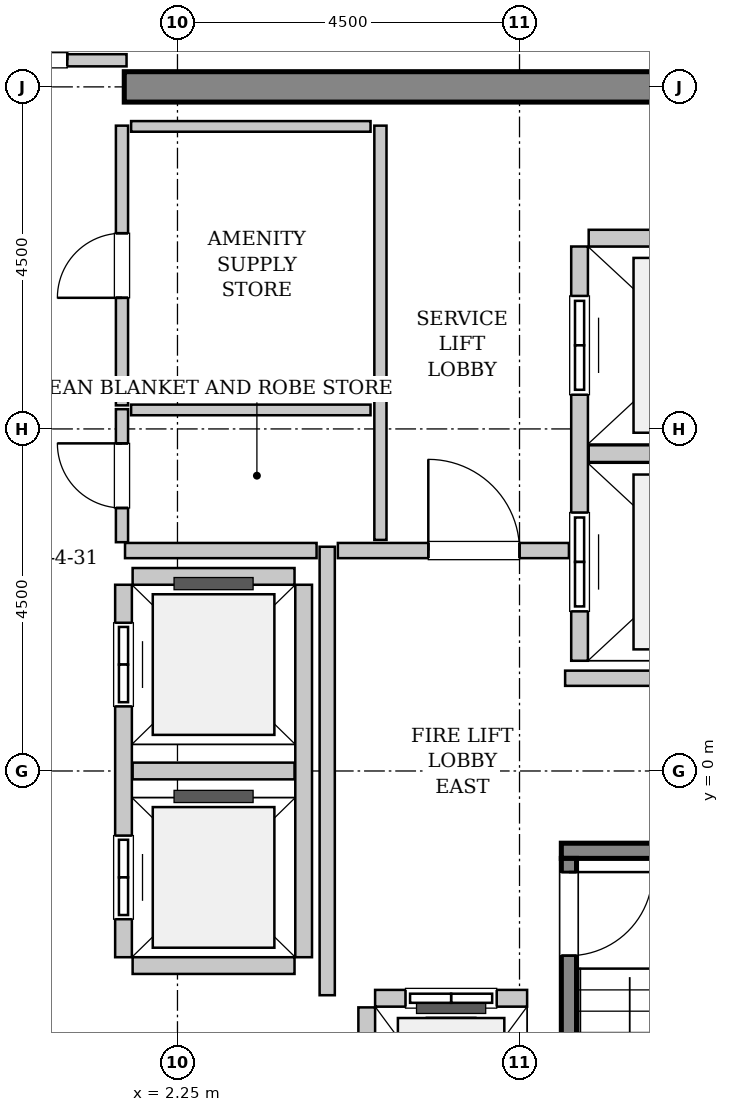
"""IFC4 building model, lengths in metres.
Left out: names, types, materials, properties, quantities, classifications, styles, units other than length and angle.
Written with IfcOpenShell. Run it as: python <this file> out.ifc"""

import sys

from ifc_helpers import new_model, si_unit, direction, frame, frame_2d, origin, place, context, subcontext, project, spatial, rectangle, extrude, source, transform, mapped, element, fill, save


model = new_model("IFC4")
c1 = context("Model", 3, precision=1e-05, world=origin(), true_north=direction((0.0, 1.0)))
c2 = subcontext(c1, "Body", "Model", "MODEL_VIEW")
j1 = project(units=[si_unit("LENGTHUNIT", "METRE"), si_unit("PLANEANGLEUNIT", "RADIAN")], contexts=[c1])
p1 = place(None, origin())
s1 = spatial("IfcSite", under=j1, at=p1, CompositionType="ELEMENT")
p2 = place(p1, origin())
s2 = spatial("IfcBuilding", under=s1, at=p2, CompositionType="ELEMENT")
p3 = place(p2, frame((0.0, 0.0, 349.0)))
s3 = spatial("IfcBuildingStorey", under=s2, at=p3, CompositionType="ELEMENT", Elevation=349.0)
m1 = source(origin(), c2, "Body", "SweptSolid", [
    extrude(rectangle(XDim=9.9, YDim=0.4, at=frame_2d((4.95, 0.0))), origin(), (0.0, 0.0, 1.0), 4.8),
])
p4 = place(p3, frame((1.55, 9.0, 0.0), z_axis=(0.0, 0.0, 1.0), x_axis=(1.0, 0.0, 0.0)))
e1 = element("IfcWall", 1, at=p4, inside=s3, PredefinedType="SHEAR", context=c2, shape_type="MappedRepresentation", body=[
    mapped(m1, transform((0.0, 0.0, 0.0), x_axis=(1.0, 0.0, 0.0), y_axis=(0.0, 1.0, 0.0), z_axis=(0.0, 0.0, 1.0), scale=1.0)),
])
m2 = source(origin(), c2, "Body", "SweptSolid", [
    extrude(rectangle(XDim=3.4, YDim=0.2, at=frame_2d((1.7, 0.0))), origin(), (0.0, 0.0, 1.0), 4.8),
])
p5 = place(p3, frame((7.3, -1.05, 0.0), z_axis=(0.0, 0.0, 1.0), x_axis=(1.0, 0.0, 0.0)))
e2 = element("IfcWall", 2, at=p5, inside=s3, PredefinedType="SOLIDWALL", context=c2, shape_type="MappedRepresentation", body=[
    mapped(m2, transform((0.0, 0.0, 0.0), x_axis=(1.0, 0.0, 0.0), y_axis=(0.0, 1.0, 0.0), z_axis=(0.0, 0.0, 1.0), scale=1.0)),
])
m3 = source(origin(), c2, "Body", "SweptSolid", [
    extrude(rectangle(XDim=7.1, YDim=0.2, at=frame_2d((3.55, 0.0))), origin(), (0.0, 0.0, 1.0), 4.8),
])
p6 = place(p3, frame((7.4, -1.15, 0.0), z_axis=(0.0, 0.0, 1.0), x_axis=(0.0, -1.0, 0.0)))
e3 = element("IfcWall", 3, at=p6, inside=s3, PredefinedType="SOLIDWALL", context=c2, shape_type="MappedRepresentation", body=[
    mapped(m3, transform((0.0, 0.0, 0.0), x_axis=(1.0, 0.0, 0.0), y_axis=(0.0, 1.0, 0.0), z_axis=(0.0, 0.0, 1.0), scale=1.0)),
])
p7 = place(p6, frame((0.18, 0.0, 0.0)))
e4 = element("IfcOpeningElement", 4, at=p7, cuts=e3, PredefinedType="OPENING", context=c2, shape_type="SweptSolid", body=[
    extrude(rectangle(XDim=1.1, YDim=2.15, at=frame_2d((0.55, 1.075))), frame((0.0, 0.11, 0.0), z_axis=(0.0, -1.0, 0.0), x_axis=(1.0, 0.0, 0.0)), (0.0, 0.0, 1.0), 0.22),
])
m4 = source(origin(), c2, "Body", "SweptSolid", [
    extrude(rectangle(XDim=2.0, YDim=0.22, at=frame_2d((1.0, 0.0))), origin(), (0.0, 0.0, 1.0), 4.485),
])
p8 = place(p3, frame((6.85, -2.99, 0.0), z_axis=(0.0, 0.0, 1.0), x_axis=(-1.0, 0.0, 0.0)))
e5 = element("IfcWall", 5, at=p8, inside=s3, PredefinedType="SOLIDWALL", context=c2, shape_type="MappedRepresentation", body=[
    mapped(m4, transform((0.0, 0.0, 0.0), x_axis=(1.0, 0.0, 0.0), y_axis=(0.0, 1.0, 0.0), z_axis=(0.0, 0.0, 1.0), scale=1.0)),
])
p9 = place(p8, frame((0.4, 0.0, 0.0)))
e6 = element("IfcOpeningElement", 6, at=p9, cuts=e5, PredefinedType="OPENING", context=c2, shape_type="SweptSolid", body=[
    extrude(rectangle(XDim=1.2, YDim=2.2, at=frame_2d((0.6, 1.1))), frame((0.0, 0.12, 0.0), z_axis=(0.0, -1.0, 0.0), x_axis=(1.0, 0.0, 0.0)), (0.0, 0.0, 1.0), 0.24),
])
m5 = source(origin(), c2, "Body", "SweptSolid", [
    extrude(rectangle(XDim=2.68, YDim=0.22, at=frame_2d((1.34, 0.0))), origin(), (0.0, 0.0, 1.0), 4.485),
])
p10 = place(p3, frame((4.74, -3.11, 0.0), z_axis=(0.0, 0.0, 1.0), x_axis=(0.0, -1.0, 0.0)))
e7 = element("IfcWall", 7, at=p10, inside=s3, PredefinedType="SOLIDWALL", context=c2, shape_type="MappedRepresentation", body=[
    mapped(m5, transform((0.0, 0.0, 0.0), x_axis=(1.0, 0.0, 0.0), y_axis=(0.0, 1.0, 0.0), z_axis=(0.0, 0.0, 1.0), scale=1.0)),
])
m6 = source(origin(), c2, "Body", "SweptSolid", [
    extrude(rectangle(XDim=5.45, YDim=0.22, at=frame_2d((2.725, 0.0))), origin(), (0.0, 0.0, 1.0), 4.485),
])
p11 = place(p3, frame((7.54, 6.9, 0.0), z_axis=(0.0, 0.0, 1.0), x_axis=(0.0, -1.0, 0.0)))
e8 = element("IfcWall", 8, at=p11, inside=s3, PredefinedType="SOLIDWALL", context=c2, shape_type="MappedRepresentation", body=[
    mapped(m6, transform((0.0, 0.0, 0.0), x_axis=(1.0, 0.0, 0.0), y_axis=(0.0, 1.0, 0.0), z_axis=(0.0, 0.0, 1.0), scale=1.0)),
])
p12 = place(p11, frame((3.5, 0.0, 0.0)))
e9 = element("IfcOpeningElement", 9, at=p12, cuts=e8, PredefinedType="OPENING", context=c2, shape_type="SweptSolid", body=[
    extrude(rectangle(XDim=1.3, YDim=2.3, at=frame_2d((0.65, 1.15))), frame((0.0, 0.12, 0.0), z_axis=(0.0, -1.0, 0.0), x_axis=(1.0, 0.0, 0.0)), (0.0, 0.0, 1.0), 0.24),
])
p13 = place(p11, frame((0.65, 0.0, 0.0)))
e10 = element("IfcOpeningElement", 10, at=p13, cuts=e8, PredefinedType="OPENING", context=c2, shape_type="SweptSolid", body=[
    extrude(rectangle(XDim=1.3, YDim=2.3, at=frame_2d((0.65, 1.15))), frame((0.0, 0.12, 0.0), z_axis=(0.0, -1.0, 0.0), x_axis=(1.0, 0.0, 0.0)), (0.0, 0.0, 1.0), 0.24),
])
m7 = source(origin(), c2, "Body", "SweptSolid", [
    extrude(rectangle(XDim=2.78, YDim=0.22, at=frame_2d((1.39, 0.0))), origin(), (0.0, 0.0, 1.0), 4.485),
])
for number, where, z_axis, x_axis in (
    (11, (7.66, 4.175, 0.0), (0.0, 0.0, 1.0), (1.0, 0.0, 0.0)),
    (12, (10.44, 7.01, 0.0), (0.0, 0.0, 1.0), (-1.0, 0.0, 0.0)),
):
    element("IfcWall", number, at=place(p3, frame(where, z_axis=z_axis, x_axis=x_axis)), inside=s3, PredefinedType="SOLIDWALL", context=c2, shape_type="MappedRepresentation", body=[
        mapped(m7, transform((0.0, 0.0, 0.0), x_axis=(1.0, 0.0, 0.0), y_axis=(0.0, 1.0, 0.0), z_axis=(0.0, 0.0, 1.0), scale=1.0)),
    ])
m8 = source(origin(), c2, "Body", "SweptSolid", [
    extrude(rectangle(XDim=4.9, YDim=0.22, at=frame_2d((2.45, 0.0))), origin(), (0.0, 0.0, 1.0), 4.485),
])
p14 = place(p3, frame((1.54, 2.45, 0.0), z_axis=(0.0, 0.0, 1.0), x_axis=(0.0, -1.0, 0.0)))
e13 = element("IfcWall", 13, at=p14, inside=s3, PredefinedType="SOLIDWALL", context=c2, shape_type="MappedRepresentation", body=[
    mapped(m8, transform((0.0, 0.0, 0.0), x_axis=(1.0, 0.0, 0.0), y_axis=(0.0, 1.0, 0.0), z_axis=(0.0, 0.0, 1.0), scale=1.0)),
])
p15 = place(p14, frame((3.3, 0.0, 0.0)))
e14 = element("IfcOpeningElement", 14, at=p15, cuts=e13, PredefinedType="OPENING", context=c2, shape_type="SweptSolid", body=[
    extrude(rectangle(XDim=1.1, YDim=2.2, at=frame_2d((0.55, 1.1))), frame((0.0, 0.12, 0.0), z_axis=(0.0, -1.0, 0.0), x_axis=(1.0, 0.0, 0.0)), (0.0, 0.0, 1.0), 0.24),
])
p16 = place(p14, frame((0.5, 0.0, 0.0)))
e15 = element("IfcOpeningElement", 15, at=p16, cuts=e13, PredefinedType="OPENING", context=c2, shape_type="SweptSolid", body=[
    extrude(rectangle(XDim=1.1, YDim=2.2, at=frame_2d((0.55, 1.1))), frame((0.0, 0.12, 0.0), z_axis=(0.0, -1.0, 0.0), x_axis=(1.0, 0.0, 0.0)), (0.0, 0.0, 1.0), 0.24),
])
p17 = place(p3, frame((3.91, -2.45, 0.0), z_axis=(0.0, 0.0, 1.0), x_axis=(0.0, 1.0, 0.0)))
e16 = element("IfcWall", 16, at=p17, inside=s3, PredefinedType="SOLIDWALL", context=c2, shape_type="MappedRepresentation", body=[
    mapped(m8, transform((0.0, 0.0, 0.0), x_axis=(1.0, 0.0, 0.0), y_axis=(0.0, 1.0, 0.0), z_axis=(0.0, 0.0, 1.0), scale=1.0)),
])
m9 = source(origin(), c2, "Body", "SweptSolid", [
    extrude(rectangle(XDim=2.13, YDim=0.22, at=frame_2d((1.065, 0.0))), origin(), (0.0, 0.0, 1.0), 4.485),
])
for number, where, z_axis, x_axis in (
    (17, (1.66, -2.56, 0.0), (0.0, 0.0, 1.0), (1.0, 0.0, 0.0)),
    (18, (1.66, 0.0, 0.0), (0.0, 0.0, 1.0), (1.0, 0.0, 0.0)),
    (19, (3.79, 2.56, 0.0), (0.0, 0.0, 1.0), (-1.0, 0.0, 0.0)),
):
    element("IfcWall", number, at=place(p3, frame(where, z_axis=z_axis, x_axis=x_axis)), inside=s3, PredefinedType="SOLIDWALL", context=c2, shape_type="MappedRepresentation", body=[
        mapped(m9, transform((0.0, 0.0, 0.0), x_axis=(1.0, 0.0, 0.0), y_axis=(0.0, 1.0, 0.0), z_axis=(0.0, 0.0, 1.0), scale=1.0)),
    ])
m10 = source(origin(), c2, "Body", "SweptSolid", [
    extrude(rectangle(XDim=5.9, YDim=0.2, at=frame_2d((2.95, 0.0))), origin(), (0.0, 0.0, 1.0), 4.485),
])
p18 = place(p3, frame((4.22, -2.95, 0.0), z_axis=(0.0, 0.0, 1.0), x_axis=(0.0, 1.0, 0.0)))
e20 = element("IfcWall", 20, at=p18, inside=s3, PredefinedType="PARTITIONING", context=c2, shape_type="MappedRepresentation", body=[
    mapped(m10, transform((0.0, 0.0, 0.0), x_axis=(1.0, 0.0, 0.0), y_axis=(0.0, 1.0, 0.0), z_axis=(0.0, 0.0, 1.0), scale=1.0)),
])
m11 = source(origin(), c2, "Body", "SweptSolid", [
    extrude(rectangle(XDim=2.52, YDim=0.2, at=frame_2d((1.26, 0.0))), origin(), (0.0, 0.0, 1.0), 4.485),
])
p19 = place(p3, frame((1.56, 2.9, 0.0), z_axis=(0.0, 0.0, 1.0), x_axis=(1.0, 0.0, 0.0)))
e21 = element("IfcWall", 21, at=p19, inside=s3, PredefinedType="PARTITIONING", context=c2, shape_type="MappedRepresentation", body=[
    mapped(m11, transform((0.0, 0.0, 0.0), x_axis=(1.0, 0.0, 0.0), y_axis=(0.0, 1.0, 0.0), z_axis=(0.0, 0.0, 1.0), scale=1.0)),
])
m12 = source(origin(), c2, "Body", "SweptSolid", [
    extrude(rectangle(XDim=3.04, YDim=0.2, at=frame_2d((1.52, 0.0))), origin(), (0.0, 0.0, 1.0), 4.485),
])
p20 = place(p3, frame((4.36, 2.9, 0.0), z_axis=(0.0, 0.0, 1.0), x_axis=(1.0, 0.0, 0.0)))
e22 = element("IfcWall", 22, at=p20, inside=s3, PredefinedType="PARTITIONING", context=c2, shape_type="MappedRepresentation", body=[
    mapped(m12, transform((0.0, 0.0, 0.0), x_axis=(1.0, 0.0, 0.0), y_axis=(0.0, 1.0, 0.0), z_axis=(0.0, 0.0, 1.0), scale=1.0)),
])
p21 = place(p20, frame((1.19, 0.0, 0.0)))
e23 = element("IfcOpeningElement", 23, at=p21, cuts=e22, PredefinedType="OPENING", context=c2, shape_type="SweptSolid", body=[
    extrude(rectangle(XDim=1.2, YDim=2.15, at=frame_2d((0.6, 1.075))), frame((0.0, 0.11, 0.0), z_axis=(0.0, -1.0, 0.0), x_axis=(1.0, 0.0, 0.0)), (0.0, 0.0, 1.0), 0.22),
])
m13 = source(origin(), c2, "Body", "SweptSolid", [
    extrude(rectangle(XDim=4.11, YDim=0.2, at=frame_2d((2.055, 0.0))), origin(), (0.0, 0.0, 1.0), 4.485),
])
p22 = place(p3, frame((7.35, 1.22, 0.0), z_axis=(0.0, 0.0, 1.0), x_axis=(1.0, 0.0, 0.0)))
e24 = element("IfcWall", 24, at=p22, inside=s3, PredefinedType="PARTITIONING", context=c2, shape_type="MappedRepresentation", body=[
    mapped(m13, transform((0.0, 0.0, 0.0), x_axis=(1.0, 0.0, 0.0), y_axis=(0.0, 1.0, 0.0), z_axis=(0.0, 0.0, 1.0), scale=1.0)),
])
m14 = source(origin(), c2, "Body", "SweptSolid", [
    extrude(rectangle(XDim=3.16, YDim=0.16, at=frame_2d((1.58, 0.0))), origin(), (0.0, 0.0, 1.0), 3.575),
])
p23 = place(p3, frame((-1.58, 9.35, 0.0), z_axis=(0.0, 0.0, 1.0), x_axis=(1.0, 0.0, 0.0)))
e25 = element("IfcWall", 25, at=p23, inside=s3, PredefinedType="PARTITIONING", context=c2, shape_type="MappedRepresentation", body=[
    mapped(m14, transform((0.0, 0.0, 0.0), x_axis=(1.0, 0.0, 0.0), y_axis=(0.0, 1.0, 0.0), z_axis=(0.0, 0.0, 1.0), scale=1.0)),
])
p24 = place(p23, frame((0.78, 0.0, 0.0)))
e26 = element("IfcOpeningElement", 26, at=p24, cuts=e25, PredefinedType="OPENING", context=c2, shape_type="SweptSolid", body=[
    extrude(rectangle(XDim=1.6, YDim=2.3, at=frame_2d((0.8, 1.15))), frame((0.0, 0.09, 0.0), z_axis=(0.0, -1.0, 0.0), x_axis=(1.0, 0.0, 0.0)), (0.0, 0.0, 1.0), 0.18),
])
m15 = source(origin(), c2, "Body", "SweptSolid", [
    extrude(rectangle(XDim=5.45, YDim=0.16, at=frame_2d((2.725, 0.0))), origin(), (0.0, 0.0, 1.0), 4.485),
])
p25 = place(p3, frame((4.92, 3.04, 0.0), z_axis=(0.0, 0.0, 1.0), x_axis=(0.0, 1.0, 0.0)))
e27 = element("IfcWall", 27, at=p25, inside=s3, PredefinedType="PARTITIONING", context=c2, shape_type="MappedRepresentation", body=[
    mapped(m15, transform((0.0, 0.0, 0.0), x_axis=(1.0, 0.0, 0.0), y_axis=(0.0, 1.0, 0.0), z_axis=(0.0, 0.0, 1.0), scale=1.0)),
])
m16 = source(origin(), c2, "Body", "SweptSolid", [
    extrude(rectangle(XDim=1.75, YDim=0.16, at=frame_2d((0.875, 0.0))), origin(), (0.0, 0.0, 1.0), 4.485),
])
p26 = place(p3, frame((1.52, 3.01, 0.0), z_axis=(0.0, 0.0, 1.0), x_axis=(0.0, 1.0, 0.0)))
e28 = element("IfcWall", 28, at=p26, inside=s3, PredefinedType="PARTITIONING", context=c2, shape_type="MappedRepresentation", body=[
    mapped(m16, transform((0.0, 0.0, 0.0), x_axis=(1.0, 0.0, 0.0), y_axis=(0.0, 1.0, 0.0), z_axis=(0.0, 0.0, 1.0), scale=1.0)),
])
p27 = place(p26, frame((0.45, 0.0, 0.0)))
e29 = element("IfcOpeningElement", 29, at=p27, cuts=e28, PredefinedType="OPENING", context=c2, shape_type="SweptSolid", body=[
    extrude(rectangle(XDim=0.85, YDim=2.1, at=frame_2d((0.425, 1.05))), frame((0.0, 0.09, 0.0), z_axis=(0.0, -1.0, 0.0), x_axis=(1.0, 0.0, 0.0)), (0.0, 0.0, 1.0), 0.18),
])
m17 = source(origin(), c2, "Body", "SweptSolid", [
    extrude(rectangle(XDim=3.15, YDim=0.14, at=frame_2d((1.575, 0.0))), origin(), (0.0, 0.0, 1.0), 4.485),
])
p28 = place(p3, frame((1.64, 4.75, 0.0), z_axis=(0.0, 0.0, 1.0), x_axis=(1.0, 0.0, 0.0)))
e30 = element("IfcWall", 30, at=p28, inside=s3, PredefinedType="PARTITIONING", context=c2, shape_type="MappedRepresentation", body=[
    mapped(m17, transform((0.0, 0.0, 0.0), x_axis=(1.0, 0.0, 0.0), y_axis=(0.0, 1.0, 0.0), z_axis=(0.0, 0.0, 1.0), scale=1.0)),
])
m18 = source(origin(), c2, "Body", "SweptSolid", [
    extrude(rectangle(XDim=3.68, YDim=0.16, at=frame_2d((1.84, 0.0))), origin(), (0.0, 0.0, 1.0), 4.485),
])
p29 = place(p3, frame((1.52, 4.81, 0.0), z_axis=(0.0, 0.0, 1.0), x_axis=(0.0, 1.0, 0.0)))
e31 = element("IfcWall", 31, at=p29, inside=s3, PredefinedType="PARTITIONING", context=c2, shape_type="MappedRepresentation", body=[
    mapped(m18, transform((0.0, 0.0, 0.0), x_axis=(1.0, 0.0, 0.0), y_axis=(0.0, 1.0, 0.0), z_axis=(0.0, 0.0, 1.0), scale=1.0)),
])
p30 = place(p29, frame((1.415, 0.0, 0.0)))
e32 = element("IfcOpeningElement", 32, at=p30, cuts=e31, PredefinedType="OPENING", context=c2, shape_type="SweptSolid", body=[
    extrude(rectangle(XDim=0.85, YDim=2.1, at=frame_2d((0.425, 1.05))), frame((0.0, 0.09, 0.0), z_axis=(0.0, -1.0, 0.0), x_axis=(1.0, 0.0, 0.0)), (0.0, 0.0, 1.0), 0.18),
])
p31 = place(p3, frame((1.64, 8.48, 0.0), z_axis=(0.0, 0.0, 1.0), x_axis=(1.0, 0.0, 0.0)))
e33 = element("IfcWall", 33, at=p31, inside=s3, PredefinedType="PARTITIONING", context=c2, shape_type="MappedRepresentation", body=[
    mapped(m17, transform((0.0, 0.0, 0.0), x_axis=(1.0, 0.0, 0.0), y_axis=(0.0, 1.0, 0.0), z_axis=(0.0, 0.0, 1.0), scale=1.0)),
])
m19 = source(origin(), c2, "Body", "SweptSolid", [
    extrude(rectangle(XDim=1.1, YDim=2.15, at=frame_2d((0.55, 1.075))), frame((0.0, 0.025, 0.0), z_axis=(0.0, -1.0, 0.0), x_axis=(1.0, 0.0, 0.0)), (0.0, 0.0, 1.0), 0.05),
])
p32 = place(p7, origin())
e34 = element("IfcDoor", 34, at=p32, inside=s3, OperationType="SINGLE_SWING_LEFT", PredefinedType="DOOR", context=c2, shape_type="MappedRepresentation", body=[
    mapped(m19, transform((0.0, 0.0, 0.0), x_axis=(1.0, 0.0, 0.0), y_axis=(0.0, 1.0, 0.0), z_axis=(0.0, 0.0, 1.0), scale=1.0)),
])
fill(e4, e34)
m20 = source(origin(), c2, "Body", "SweptSolid", [
    extrude(rectangle(XDim=1.2, YDim=2.2, at=frame_2d((0.6, 1.1))), frame((0.0, 0.025, 0.0), z_axis=(0.0, -1.0, 0.0), x_axis=(1.0, 0.0, 0.0)), (0.0, 0.0, 1.0), 0.05),
])
p33 = place(p9, origin())
e35 = element("IfcDoor", 35, at=p33, inside=s3, OperationType="SLIDING_TO_LEFT", PredefinedType="DOOR", context=c2, shape_type="MappedRepresentation", body=[
    mapped(m20, transform((0.0, 0.0, 0.0), x_axis=(1.0, 0.0, 0.0), y_axis=(0.0, 1.0, 0.0), z_axis=(0.0, 0.0, 1.0), scale=1.0)),
])
fill(e6, e35)
m21 = source(origin(), c2, "Body", "SweptSolid", [
    extrude(rectangle(XDim=1.3, YDim=2.3, at=frame_2d((0.65, 1.15))), frame((0.0, 0.025, 0.0), z_axis=(0.0, -1.0, 0.0), x_axis=(1.0, 0.0, 0.0)), (0.0, 0.0, 1.0), 0.05),
])
p34 = place(p12, origin())
e36 = element("IfcDoor", 36, at=p34, inside=s3, OperationType="SLIDING_TO_RIGHT", PredefinedType="DOOR", context=c2, shape_type="MappedRepresentation", body=[
    mapped(m21, transform((0.0, 0.0, 0.0), x_axis=(1.0, 0.0, 0.0), y_axis=(0.0, 1.0, 0.0), z_axis=(0.0, 0.0, 1.0), scale=1.0)),
])
fill(e9, e36)
p35 = place(p13, origin())
e37 = element("IfcDoor", 37, at=p35, inside=s3, OperationType="SLIDING_TO_RIGHT", PredefinedType="DOOR", context=c2, shape_type="MappedRepresentation", body=[
    mapped(m21, transform((0.0, 0.0, 0.0), x_axis=(1.0, 0.0, 0.0), y_axis=(0.0, 1.0, 0.0), z_axis=(0.0, 0.0, 1.0), scale=1.0)),
])
fill(e10, e37)
m22 = source(origin(), c2, "Body", "SweptSolid", [
    extrude(rectangle(XDim=1.1, YDim=2.2, at=frame_2d((0.55, 1.1))), frame((0.0, 0.025, 0.0), z_axis=(0.0, -1.0, 0.0), x_axis=(1.0, 0.0, 0.0)), (0.0, 0.0, 1.0), 0.05),
])
p36 = place(p15, origin())
e38 = element("IfcDoor", 38, at=p36, inside=s3, OperationType="DOUBLE_DOOR_SLIDING", PredefinedType="DOOR", context=c2, shape_type="MappedRepresentation", body=[
    mapped(m22, transform((0.0, 0.0, 0.0), x_axis=(1.0, 0.0, 0.0), y_axis=(0.0, 1.0, 0.0), z_axis=(0.0, 0.0, 1.0), scale=1.0)),
])
fill(e14, e38)
p37 = place(p16, origin())
e39 = element("IfcDoor", 39, at=p37, inside=s3, OperationType="DOUBLE_DOOR_SLIDING", PredefinedType="DOOR", context=c2, shape_type="MappedRepresentation", body=[
    mapped(m22, transform((0.0, 0.0, 0.0), x_axis=(1.0, 0.0, 0.0), y_axis=(0.0, 1.0, 0.0), z_axis=(0.0, 0.0, 1.0), scale=1.0)),
])
fill(e15, e39)
m23 = source(origin(), c2, "Body", "SweptSolid", [
    extrude(rectangle(XDim=1.2, YDim=2.15, at=frame_2d((0.6, 1.075))), frame((0.0, 0.025, 0.0), z_axis=(0.0, -1.0, 0.0), x_axis=(1.0, 0.0, 0.0)), (0.0, 0.0, 1.0), 0.05),
])
p38 = place(p21, origin())
e40 = element("IfcDoor", 40, at=p38, inside=s3, OperationType="SINGLE_SWING_LEFT", PredefinedType="DOOR", context=c2, shape_type="MappedRepresentation", body=[
    mapped(m23, transform((0.0, 0.0, 0.0), x_axis=(1.0, 0.0, 0.0), y_axis=(0.0, 1.0, 0.0), z_axis=(0.0, 0.0, 1.0), scale=1.0)),
])
fill(e23, e40)
m24 = source(origin(), c2, "Body", "SweptSolid", [
    extrude(rectangle(XDim=1.6, YDim=2.3, at=frame_2d((0.8, 1.15))), frame((0.0, 0.025, 0.0), z_axis=(0.0, -1.0, 0.0), x_axis=(1.0, 0.0, 0.0)), (0.0, 0.0, 1.0), 0.05),
])
p39 = place(p24, origin())
e41 = element("IfcDoor", 41, at=p39, inside=s3, OperationType="DOUBLE_DOOR_SINGLE_SWING", PredefinedType="DOOR", context=c2, shape_type="MappedRepresentation", body=[
    mapped(m24, transform((0.0, 0.0, 0.0), x_axis=(1.0, 0.0, 0.0), y_axis=(0.0, 1.0, 0.0), z_axis=(0.0, 0.0, 1.0), scale=1.0)),
])
fill(e26, e41)
m25 = source(origin(), c2, "Body", "SweptSolid", [
    extrude(rectangle(XDim=0.85, YDim=2.1, at=frame_2d((0.425, 1.05))), frame((0.0, 0.025, 0.0), z_axis=(0.0, -1.0, 0.0), x_axis=(1.0, 0.0, 0.0)), (0.0, 0.0, 1.0), 0.05),
])
p40 = place(p27, origin())
e42 = element("IfcDoor", 42, at=p40, inside=s3, OperationType="SINGLE_SWING_RIGHT", PredefinedType="DOOR", context=c2, shape_type="MappedRepresentation", body=[
    mapped(m25, transform((0.0, 0.0, 0.0), x_axis=(1.0, 0.0, 0.0), y_axis=(0.0, 1.0, 0.0), z_axis=(0.0, 0.0, 1.0), scale=1.0)),
])
fill(e29, e42)
p41 = place(p30, origin())
e43 = element("IfcDoor", 43, at=p41, inside=s3, OperationType="SINGLE_SWING_LEFT", PredefinedType="DOOR", context=c2, shape_type="MappedRepresentation", body=[
    mapped(m25, transform((0.0, 0.0, 0.0), x_axis=(1.0, 0.0, 0.0), y_axis=(0.0, 1.0, 0.0), z_axis=(0.0, 0.0, 1.0), scale=1.0)),
])
fill(e32, e43)
save(model, sys.argv[1])
